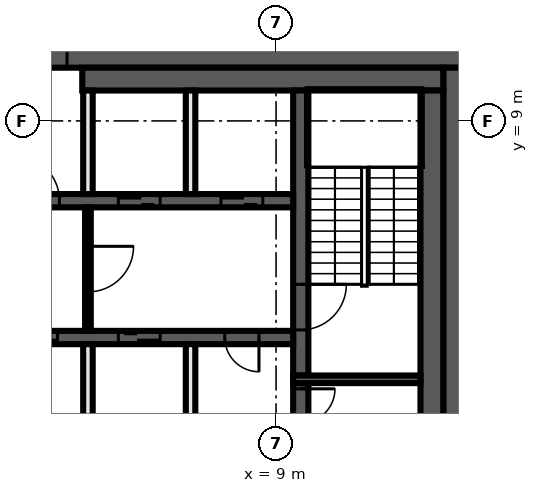
"""IFC4 building model, lengths in metres.
Left out: names, types, materials, properties, quantities, classifications, styles, units other than length and angle.
Written with IfcOpenShell. Run it as: python <this file> out.ifc"""

import sys

from ifc_helpers import new_model, si_unit, direction, frame, frame_2d, origin, place, context, subcontext, project, spatial, rectangle, extrude, element, fill, save


model = new_model("IFC4")
c1 = context("Model", 3, precision=1e-05, world=origin(), true_north=direction((0.0, 1.0)))
c2 = subcontext(c1, "Body", "Model", "MODEL_VIEW")
j1 = project(units=[si_unit("LENGTHUNIT", "METRE"), si_unit("PLANEANGLEUNIT", "RADIAN")], contexts=[c1])
p1 = place(None, origin())
s1 = spatial("IfcSite", under=j1, at=p1, CompositionType="ELEMENT")
p2 = place(p1, origin())
s2 = spatial("IfcBuilding", under=s1, at=p2, CompositionType="ELEMENT")
p3 = place(p2, frame((0.0, 0.0, 298.4)))
s3 = spatial("IfcBuildingStorey", under=s2, at=p3, CompositionType="ELEMENT", Elevation=298.4)
p4 = place(p3, frame((-14.0, 10.7, 0.0), z_axis=(0.0, 0.0, 1.0), x_axis=(1.0, 0.0, 0.0)))
e1 = element("IfcWall", 1, at=p4, inside=s3, PredefinedType="SHEAR", context=c2, shape_type="SweptSolid", body=[
    extrude(rectangle(XDim=28.0, YDim=0.6, at=frame_2d((14.0, 0.0))), origin(), (0.0, 0.0, 1.0), 3.82),
])
p5 = place(p4, frame((15.9, 0.0, 0.0)))
e2 = element("IfcOpeningElement", 2, at=p5, cuts=e1, PredefinedType="OPENING", context=c2, shape_type="SweptSolid", body=[
    extrude(rectangle(XDim=1.6, YDim=2.1, at=frame_2d((0.8, 1.05))), frame((0.0, 0.31, 0.0), z_axis=(0.0, -1.0, 0.0), x_axis=(1.0, 0.0, 0.0)), (0.0, 0.0, 1.0), 0.62),
])
p6 = place(p3, frame((13.7, 10.4, 0.0), z_axis=(0.0, 0.0, 1.0), x_axis=(0.0, -1.0, 0.0)))
e3 = element("IfcWall", 3, at=p6, inside=s3, PredefinedType="SHEAR", context=c2, shape_type="SweptSolid", body=[
    extrude(rectangle(XDim=20.8, YDim=0.6, at=frame_2d((10.4, 0.0))), origin(), (0.0, 0.0, 1.0), 3.82),
])
p7 = place(p3, frame((3.9, 10.1, 0.0), z_axis=(0.0, 0.0, 1.0), x_axis=(1.0, 0.0, 0.0)))
e4 = element("IfcWall", 4, at=p7, inside=s3, PredefinedType="SHEAR", context=c2, shape_type="SweptSolid", body=[
    extrude(rectangle(XDim=9.5, YDim=0.6, at=frame_2d((4.75, 0.0))), origin(), (0.0, 0.0, 1.0), 3.82),
])
p8 = place(p3, frame((13.1, 9.8, 0.0), z_axis=(0.0, 0.0, 1.0), x_axis=(0.0, -1.0, 0.0)))
e5 = element("IfcWall", 5, at=p8, inside=s3, PredefinedType="SHEAR", context=c2, shape_type="SweptSolid", body=[
    extrude(rectangle(XDim=19.6, YDim=0.6, at=frame_2d((9.8, 0.0))), origin(), (0.0, 0.0, 1.0), 3.82),
])
p9 = place(p3, frame((9.65, 2.1, 0.0), z_axis=(0.0, 0.0, 1.0), x_axis=(0.0, -1.0, 0.0)))
e6 = element("IfcWall", 6, at=p9, inside=s3, PredefinedType="SHEAR", context=c2, shape_type="SweptSolid", body=[
    extrude(rectangle(XDim=4.2, YDim=0.4, at=frame_2d((2.1, 0.0))), origin(), (0.0, 0.0, 1.0), 3.82),
])
p10 = place(p9, frame((0.15, 0.0, 0.0)))
e7 = element("IfcOpeningElement", 7, at=p10, cuts=e6, PredefinedType="OPENING", context=c2, shape_type="SweptSolid", body=[
    extrude(rectangle(XDim=0.9, YDim=2.1, at=frame_2d((0.45, 1.05))), frame((0.0, 0.21, 0.0), z_axis=(0.0, -1.0, 0.0), x_axis=(1.0, 0.0, 0.0)), (0.0, 0.0, 1.0), 0.42),
])
p11 = place(p3, frame((9.65, 9.8, 0.0), z_axis=(0.0, 0.0, 1.0), x_axis=(0.0, -1.0, 0.0)))
e8 = element("IfcWall", 8, at=p11, inside=s3, PredefinedType="SHEAR", context=c2, shape_type="SweptSolid", body=[
    extrude(rectangle(XDim=7.5, YDim=0.4, at=frame_2d((3.75, 0.0))), origin(), (0.0, 0.0, 1.0), 3.82),
])
p12 = place(p11, frame((5.1, 0.0, 0.0)))
e9 = element("IfcOpeningElement", 9, at=p12, cuts=e8, PredefinedType="OPENING", context=c2, shape_type="SweptSolid", body=[
    extrude(rectangle(XDim=1.2, YDim=2.1, at=frame_2d((0.6, 1.05))), frame((0.0, 0.21, 0.0), z_axis=(0.0, -1.0, 0.0), x_axis=(1.0, 0.0, 0.0)), (0.0, 0.0, 1.0), 0.42),
])
p13 = place(p3, frame((9.45, 2.2, 0.0), z_axis=(0.0, 0.0, 1.0), x_axis=(1.0, 0.0, 0.0)))
e10 = element("IfcWall", 10, at=p13, inside=s3, PredefinedType="SHEAR", context=c2, shape_type="SweptSolid", body=[
    extrude(rectangle(XDim=3.35, YDim=0.2, at=frame_2d((1.675, 0.0))), origin(), (0.0, 0.0, 1.0), 3.82),
])
p14 = place(p3, frame((-9.45, 6.9, 0.0), z_axis=(0.0, 0.0, 1.0), x_axis=(1.0, 0.0, 0.0)))
e11 = element("IfcWall", 11, at=p14, inside=s3, PredefinedType="SHEAR", context=c2, shape_type="SweptSolid", body=[
    extrude(rectangle(XDim=18.9, YDim=0.35, at=frame_2d((9.45, 0.0))), origin(), (0.0, 0.0, 1.0), 3.82),
])
p15 = place(p14, frame((11.55, 0.0, 0.0)))
e12 = element("IfcOpeningElement", 12, at=p15, cuts=e11, PredefinedType="OPENING", context=c2, shape_type="SweptSolid", body=[
    extrude(rectangle(XDim=1.2, YDim=2.1, at=frame_2d((0.6, 1.05))), frame((0.0, 0.185, 0.0), z_axis=(0.0, -1.0, 0.0), x_axis=(1.0, 0.0, 0.0)), (0.0, 0.0, 1.0), 0.37),
])
p16 = place(p14, frame((14.3, 0.0, 0.0)))
e13 = element("IfcOpeningElement", 13, at=p16, cuts=e11, PredefinedType="OPENING", context=c2, shape_type="SweptSolid", body=[
    extrude(rectangle(XDim=1.1, YDim=2.1, at=frame_2d((0.55, 1.05))), frame((0.0, 0.185, 0.0), z_axis=(0.0, -1.0, 0.0), x_axis=(1.0, 0.0, 0.0)), (0.0, 0.0, 1.0), 0.37),
])
p17 = place(p14, frame((17.0, 0.0, 0.0)))
e14 = element("IfcOpeningElement", 14, at=p17, cuts=e11, PredefinedType="OPENING", context=c2, shape_type="SweptSolid", body=[
    extrude(rectangle(XDim=1.1, YDim=2.1, at=frame_2d((0.55, 1.05))), frame((0.0, 0.185, 0.0), z_axis=(0.0, -1.0, 0.0), x_axis=(1.0, 0.0, 0.0)), (0.0, 0.0, 1.0), 0.37),
])
p18 = place(p14, frame((2.25, 0.0, 0.0)))
e15 = element("IfcOpeningElement", 15, at=p18, cuts=e11, PredefinedType="OPENING", context=c2, shape_type="SweptSolid", body=[
    extrude(rectangle(XDim=0.9, YDim=2.1, at=frame_2d((0.45, 1.05))), frame((0.0, 0.185, 0.0), z_axis=(0.0, -1.0, 0.0), x_axis=(1.0, 0.0, 0.0)), (0.0, 0.0, 1.0), 0.37),
])
p19 = place(p14, frame((7.65, 0.0, 0.0)))
e16 = element("IfcOpeningElement", 16, at=p19, cuts=e11, PredefinedType="OPENING", context=c2, shape_type="SweptSolid", body=[
    extrude(rectangle(XDim=0.9, YDim=2.1, at=frame_2d((0.45, 1.05))), frame((0.0, 0.185, 0.0), z_axis=(0.0, -1.0, 0.0), x_axis=(1.0, 0.0, 0.0)), (0.0, 0.0, 1.0), 0.37),
])
p20 = place(p3, frame((9.45, 3.3, 0.0), z_axis=(0.0, 0.0, 1.0), x_axis=(-1.0, 0.0, 0.0)))
e17 = element("IfcWall", 17, at=p20, inside=s3, PredefinedType="SHEAR", context=c2, shape_type="SweptSolid", body=[
    extrude(rectangle(XDim=18.9, YDim=0.35, at=frame_2d((9.45, 0.0))), origin(), (0.0, 0.0, 1.0), 3.82),
])
p21 = place(p20, frame((6.2, 0.0, 0.0)))
e18 = element("IfcOpeningElement", 18, at=p21, cuts=e17, PredefinedType="OPENING", context=c2, shape_type="SweptSolid", body=[
    extrude(rectangle(XDim=1.1, YDim=2.1, at=frame_2d((0.55, 1.05))), frame((0.0, 0.185, 0.0), z_axis=(0.0, -1.0, 0.0), x_axis=(1.0, 0.0, 0.0)), (0.0, 0.0, 1.0), 0.37),
])
p22 = place(p20, frame((3.5, 0.0, 0.0)))
e19 = element("IfcOpeningElement", 19, at=p22, cuts=e17, PredefinedType="OPENING", context=c2, shape_type="SweptSolid", body=[
    extrude(rectangle(XDim=1.1, YDim=2.1, at=frame_2d((0.55, 1.05))), frame((0.0, 0.185, 0.0), z_axis=(0.0, -1.0, 0.0), x_axis=(1.0, 0.0, 0.0)), (0.0, 0.0, 1.0), 0.37),
])
p23 = place(p20, frame((0.9, 0.0, 0.0)))
e20 = element("IfcOpeningElement", 20, at=p23, cuts=e17, PredefinedType="OPENING", context=c2, shape_type="SweptSolid", body=[
    extrude(rectangle(XDim=0.9, YDim=2.1, at=frame_2d((0.45, 1.05))), frame((0.0, 0.185, 0.0), z_axis=(0.0, -1.0, 0.0), x_axis=(1.0, 0.0, 0.0)), (0.0, 0.0, 1.0), 0.37),
])
p24 = place(p20, frame((15.75, 0.0, 0.0)))
e21 = element("IfcOpeningElement", 21, at=p24, cuts=e17, PredefinedType="OPENING", context=c2, shape_type="SweptSolid", body=[
    extrude(rectangle(XDim=0.9, YDim=2.1, at=frame_2d((0.45, 1.05))), frame((0.0, 0.185, 0.0), z_axis=(0.0, -1.0, 0.0), x_axis=(1.0, 0.0, 0.0)), (0.0, 0.0, 1.0), 0.37),
])
p25 = place(p20, frame((11.7, 0.0, 0.0)))
e22 = element("IfcOpeningElement", 22, at=p25, cuts=e17, PredefinedType="OPENING", context=c2, shape_type="SweptSolid", body=[
    extrude(rectangle(XDim=0.9, YDim=2.1, at=frame_2d((0.45, 1.05))), frame((0.0, 0.185, 0.0), z_axis=(0.0, -1.0, 0.0), x_axis=(1.0, 0.0, 0.0)), (0.0, 0.0, 1.0), 0.37),
])
p26 = place(p20, frame((9.0, 0.0, 0.0)))
e23 = element("IfcOpeningElement", 23, at=p26, cuts=e17, PredefinedType="OPENING", context=c2, shape_type="SweptSolid", body=[
    extrude(rectangle(XDim=0.9, YDim=2.1, at=frame_2d((0.45, 1.05))), frame((0.0, 0.185, 0.0), z_axis=(0.0, -1.0, 0.0), x_axis=(1.0, 0.0, 0.0)), (0.0, 0.0, 1.0), 0.37),
])
for number, where, z_axis, x_axis in (
    (24, (6.75, 0.4, 0.0), (0.0, 0.0, 1.0), (0.0, 1.0, 0.0)),
    (25, (6.75, 7.075, 0.0), (0.0, 0.0, 1.0), (0.0, 1.0, 0.0)),
):
    element("IfcWall", number, at=place(p3, frame(where, z_axis=z_axis, x_axis=x_axis)), inside=s3, PredefinedType="SOLIDWALL", context=c2, shape_type="SweptSolid", body=[
        extrude(rectangle(XDim=2.725, YDim=0.25, at=frame_2d((1.363, 0.0))), origin(), (0.0, 0.0, 1.0), 3.82),
    ])
p27 = place(p3, frame((4.05, 6.725, 0.0), z_axis=(0.0, 0.0, 1.0), x_axis=(0.0, -1.0, 0.0)))
e26 = element("IfcWall", 26, at=p27, inside=s3, PredefinedType="PARTITIONING", context=c2, shape_type="SweptSolid", body=[
    extrude(rectangle(XDim=3.25, YDim=0.15, at=frame_2d((1.625, 0.0))), origin(), (0.0, 0.0, 1.0), 3.82),
])
p28 = place(p27, frame((1.025, 0.0, 0.0)))
e27 = element("IfcOpeningElement", 27, at=p28, cuts=e26, PredefinedType="OPENING", context=c2, shape_type="SweptSolid", body=[
    extrude(rectangle(XDim=1.2, YDim=2.1, at=frame_2d((0.6, 1.05))), frame((0.0, 0.085, 0.0), z_axis=(0.0, -1.0, 0.0), x_axis=(1.0, 0.0, 0.0)), (0.0, 0.0, 1.0), 0.17),
])
for number, where, z_axis, x_axis in (
    (28, (4.05, 0.4, 0.0), (0.0, 0.0, 1.0), (0.0, 1.0, 0.0)),
    (29, (4.05, 7.075, 0.0), (0.0, 0.0, 1.0), (0.0, 1.0, 0.0)),
):
    element("IfcWall", number, at=place(p3, frame(where, z_axis=z_axis, x_axis=x_axis)), inside=s3, PredefinedType="SOLIDWALL", context=c2, shape_type="SweptSolid", body=[
        extrude(rectangle(XDim=2.725, YDim=0.25, at=frame_2d((1.363, 0.0))), origin(), (0.0, 0.0, 1.0), 3.82),
    ])
p29 = place(p10, origin())
e30 = element("IfcDoor", 30, at=p29, inside=s3, OperationType="SINGLE_SWING_RIGHT", PredefinedType="DOOR", context=c2, shape_type="SweptSolid", body=[
    extrude(rectangle(XDim=0.9, YDim=2.1, at=frame_2d((0.45, 1.05))), frame((0.0, 0.025, 0.0), z_axis=(0.0, -1.0, 0.0), x_axis=(1.0, 0.0, 0.0)), (0.0, 0.0, 1.0), 0.05),
])
fill(e7, e30)
p30 = place(p5, origin())
e31 = element("IfcDoor", 31, at=p30, inside=s3, OperationType="DOUBLE_DOOR_SINGLE_SWING", PredefinedType="DOOR", context=c2, shape_type="SweptSolid", body=[
    extrude(rectangle(XDim=1.6, YDim=2.1, at=frame_2d((0.8, 1.05))), frame((0.0, 0.025, 0.0), z_axis=(0.0, -1.0, 0.0), x_axis=(1.0, 0.0, 0.0)), (0.0, 0.0, 1.0), 0.05),
])
fill(e2, e31)
p31 = place(p15, origin())
e32 = element("IfcDoor", 32, at=p31, inside=s3, OperationType="SINGLE_SWING_LEFT", PredefinedType="DOOR", context=c2, shape_type="SweptSolid", body=[
    extrude(rectangle(XDim=1.2, YDim=2.1, at=frame_2d((0.6, 1.05))), frame((0.0, 0.025, 0.0), z_axis=(0.0, -1.0, 0.0), x_axis=(1.0, 0.0, 0.0)), (0.0, 0.0, 1.0), 0.05),
])
fill(e12, e32)
p32 = place(p16, origin())
e33 = element("IfcDoor", 33, at=p32, inside=s3, OperationType="DOUBLE_DOOR_SLIDING", PredefinedType="DOOR", context=c2, shape_type="SweptSolid", body=[
    extrude(rectangle(XDim=1.1, YDim=2.1, at=frame_2d((0.55, 1.05))), frame((0.0, 0.025, 0.0), z_axis=(0.0, -1.0, 0.0), x_axis=(1.0, 0.0, 0.0)), (0.0, 0.0, 1.0), 0.05),
])
fill(e13, e33)
p33 = place(p17, origin())
e34 = element("IfcDoor", 34, at=p33, inside=s3, OperationType="DOUBLE_DOOR_SLIDING", PredefinedType="DOOR", context=c2, shape_type="SweptSolid", body=[
    extrude(rectangle(XDim=1.1, YDim=2.1, at=frame_2d((0.55, 1.05))), frame((0.0, 0.025, 0.0), z_axis=(0.0, -1.0, 0.0), x_axis=(1.0, 0.0, 0.0)), (0.0, 0.0, 1.0), 0.05),
])
fill(e14, e34)
p34 = place(p21, origin())
e35 = element("IfcDoor", 35, at=p34, inside=s3, OperationType="DOUBLE_DOOR_SLIDING", PredefinedType="DOOR", context=c2, shape_type="SweptSolid", body=[
    extrude(rectangle(XDim=1.1, YDim=2.1, at=frame_2d((0.55, 1.05))), frame((0.0, 0.025, 0.0), z_axis=(0.0, -1.0, 0.0), x_axis=(1.0, 0.0, 0.0)), (0.0, 0.0, 1.0), 0.05),
])
fill(e18, e35)
p35 = place(p22, origin())
e36 = element("IfcDoor", 36, at=p35, inside=s3, OperationType="DOUBLE_DOOR_SLIDING", PredefinedType="DOOR", context=c2, shape_type="SweptSolid", body=[
    extrude(rectangle(XDim=1.1, YDim=2.1, at=frame_2d((0.55, 1.05))), frame((0.0, 0.025, 0.0), z_axis=(0.0, -1.0, 0.0), x_axis=(1.0, 0.0, 0.0)), (0.0, 0.0, 1.0), 0.05),
])
fill(e19, e36)
p36 = place(p23, origin())
e37 = element("IfcDoor", 37, at=p36, inside=s3, OperationType="SINGLE_SWING_LEFT", PredefinedType="DOOR", context=c2, shape_type="SweptSolid", body=[
    extrude(rectangle(XDim=0.9, YDim=2.1, at=frame_2d((0.45, 1.05))), frame((0.0, 0.025, 0.0), z_axis=(0.0, -1.0, 0.0), x_axis=(1.0, 0.0, 0.0)), (0.0, 0.0, 1.0), 0.05),
])
fill(e20, e37)
p37 = place(p12, origin())
e38 = element("IfcDoor", 38, at=p37, inside=s3, OperationType="SINGLE_SWING_LEFT", PredefinedType="DOOR", context=c2, shape_type="SweptSolid", body=[
    extrude(rectangle(XDim=1.2, YDim=2.1, at=frame_2d((0.6, 1.05))), frame((0.0, 0.025, 0.0), z_axis=(0.0, -1.0, 0.0), x_axis=(1.0, 0.0, 0.0)), (0.0, 0.0, 1.0), 0.05),
])
fill(e9, e38)
p38 = place(p28, origin())
e39 = element("IfcDoor", 39, at=p38, inside=s3, OperationType="SINGLE_SWING_RIGHT", PredefinedType="DOOR", context=c2, shape_type="SweptSolid", body=[
    extrude(rectangle(XDim=1.2, YDim=2.1, at=frame_2d((0.6, 1.05))), frame((0.0, 0.025, 0.0), z_axis=(0.0, -1.0, 0.0), x_axis=(1.0, 0.0, 0.0)), (0.0, 0.0, 1.0), 0.05),
])
fill(e27, e39)
save(model, sys.argv[1])
